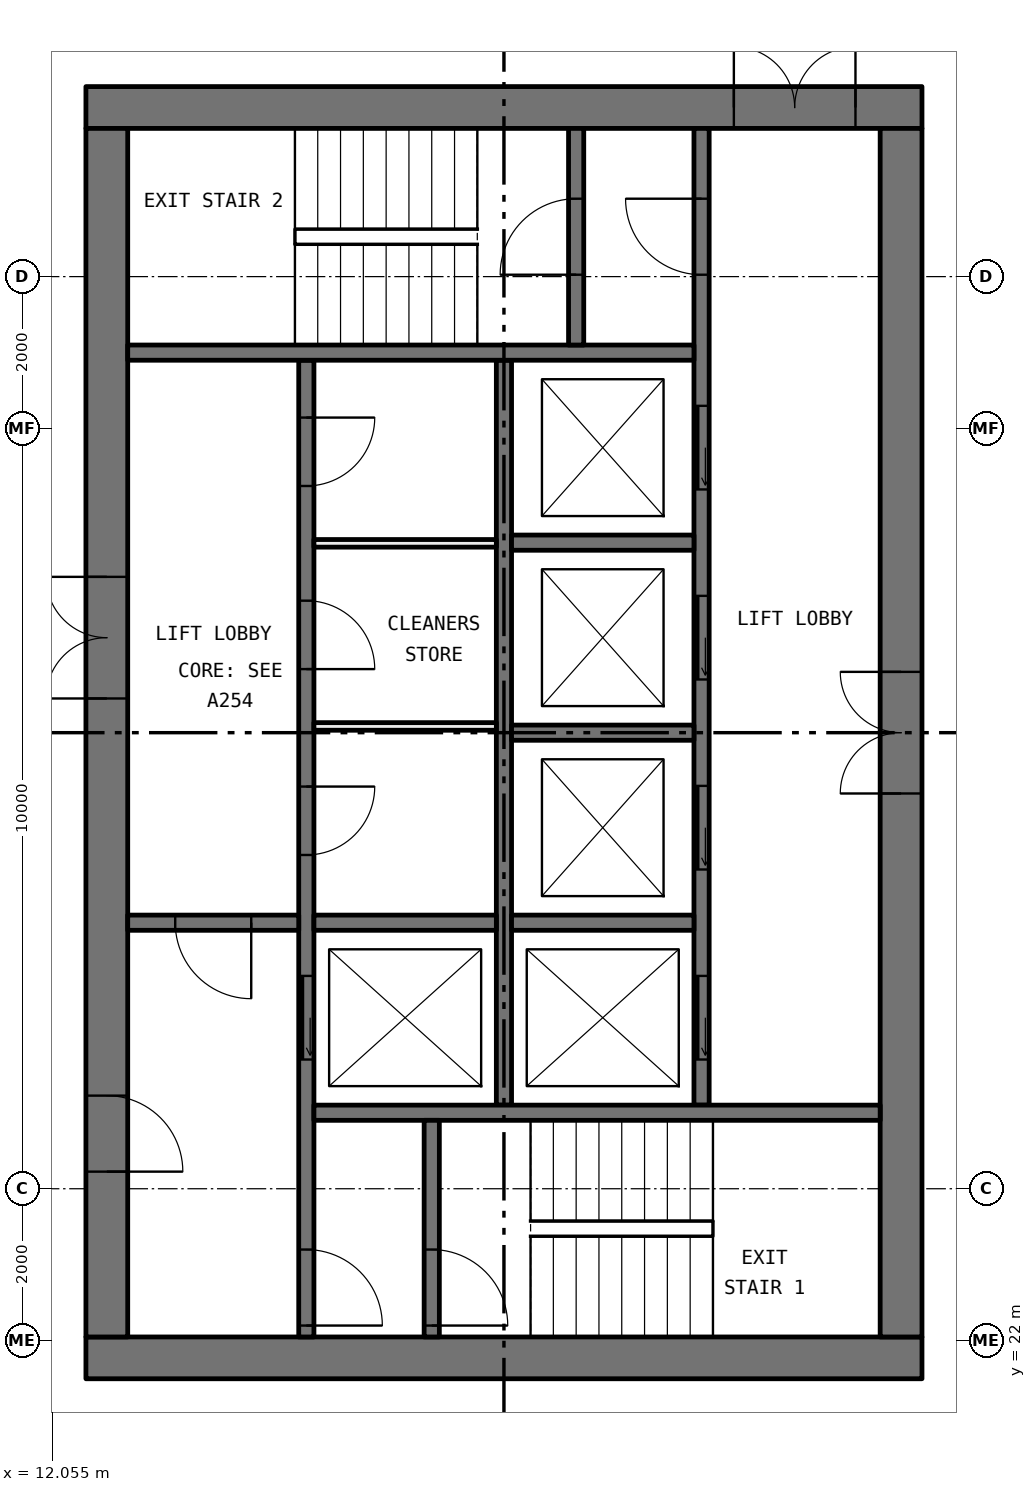
"""IFC4 building model, lengths in metres.
Left out: names, types, materials, properties, quantities, classifications, styles, units other than length and angle.
Written with IfcOpenShell. Run it as: python <this file> out.ifc"""

import sys

from ifc_helpers import new_model, si_unit, direction, frame, frame_2d, origin, place, context, subcontext, project, spatial, rectangle, extrude, element, fill, save


model = new_model("IFC4")
c1 = context("Model", 3, precision=1e-05, world=origin(), true_north=direction((0.0, 1.0)))
c2 = subcontext(c1, "Body", "Model", "MODEL_VIEW")
j1 = project(units=[si_unit("LENGTHUNIT", "METRE"), si_unit("PLANEANGLEUNIT", "RADIAN")], contexts=[c1])
p1 = place(None, origin())
s1 = spatial("IfcSite", under=j1, at=p1, CompositionType="ELEMENT")
p2 = place(p1, origin())
s2 = spatial("IfcBuilding", under=s1, at=p2, CompositionType="ELEMENT")
p3 = place(p2, frame((0.0, 0.0, 199.65)))
s3 = spatial("IfcBuildingStorey", under=s2, at=p3, CompositionType="ELEMENT", Elevation=199.65)
p4 = place(p3, frame((12.5, 21.775, 0.0), z_axis=(0.0, 0.0, 1.0), x_axis=(1.0, 0.0, 0.0)))
e1 = element("IfcWall", 1, at=p4, inside=s3, PredefinedType="SHEAR", context=c2, shape_type="SweptSolid", body=[
    extrude(rectangle(XDim=11.0, YDim=0.55, at=frame_2d((5.5, 0.0))), origin(), (0.0, 0.0, 1.0), 3.05),
])
p5 = place(p3, frame((12.5, 38.225, 0.0), z_axis=(0.0, 0.0, 1.0), x_axis=(1.0, 0.0, 0.0)))
e2 = element("IfcWall", 2, at=p5, inside=s3, PredefinedType="SHEAR", context=c2, shape_type="SweptSolid", body=[
    extrude(rectangle(XDim=11.0, YDim=0.55, at=frame_2d((5.5, 0.0))), origin(), (0.0, 0.0, 1.0), 3.05),
])
p6 = place(p5, frame((8.525, 0.0, 0.0)))
e3 = element("IfcOpeningElement", 3, at=p6, cuts=e2, PredefinedType="OPENING", context=c2, shape_type="SweptSolid", body=[
    extrude(rectangle(XDim=1.6, YDim=2.1, at=frame_2d((0.8, 1.05))), frame((0.0, 0.285, 0.0), z_axis=(0.0, -1.0, 0.0), x_axis=(1.0, 0.0, 0.0)), (0.0, 0.0, 1.0), 0.57),
])
p7 = place(p3, frame((12.775, 22.05, 0.0), z_axis=(0.0, 0.0, 1.0), x_axis=(0.0, 1.0, 0.0)))
e4 = element("IfcWall", 4, at=p7, inside=s3, PredefinedType="SHEAR", context=c2, shape_type="SweptSolid", body=[
    extrude(rectangle(XDim=15.9, YDim=0.55, at=frame_2d((7.95, 0.0))), origin(), (0.0, 0.0, 1.0), 3.05),
])
p8 = place(p7, frame((8.4, 0.0, 0.0)))
e5 = element("IfcOpeningElement", 5, at=p8, cuts=e4, PredefinedType="OPENING", context=c2, shape_type="SweptSolid", body=[
    extrude(rectangle(XDim=1.6, YDim=2.1, at=frame_2d((0.8, 1.05))), frame((0.0, 0.285, 0.0), z_axis=(0.0, -1.0, 0.0), x_axis=(1.0, 0.0, 0.0)), (0.0, 0.0, 1.0), 0.57),
])
p9 = place(p7, frame((2.175, 0.0, 0.0)))
e6 = element("IfcOpeningElement", 6, at=p9, cuts=e4, PredefinedType="OPENING", context=c2, shape_type="SweptSolid", body=[
    extrude(rectangle(XDim=1.0, YDim=2.1, at=frame_2d((0.5, 1.05))), frame((0.0, 0.285, 0.0), z_axis=(0.0, -1.0, 0.0), x_axis=(1.0, 0.0, 0.0)), (0.0, 0.0, 1.0), 0.57),
])
p10 = place(p3, frame((23.225, 22.05, 0.0), z_axis=(0.0, 0.0, 1.0), x_axis=(0.0, 1.0, 0.0)))
e7 = element("IfcWall", 7, at=p10, inside=s3, PredefinedType="SHEAR", context=c2, shape_type="SweptSolid", body=[
    extrude(rectangle(XDim=15.9, YDim=0.55, at=frame_2d((7.95, 0.0))), origin(), (0.0, 0.0, 1.0), 3.05),
])
p11 = place(p10, frame((7.15, 0.0, 0.0)))
e8 = element("IfcOpeningElement", 8, at=p11, cuts=e7, PredefinedType="OPENING", context=c2, shape_type="SweptSolid", body=[
    extrude(rectangle(XDim=1.6, YDim=2.1, at=frame_2d((0.8, 1.05))), frame((0.0, 0.285, 0.0), z_axis=(0.0, -1.0, 0.0), x_axis=(1.0, 0.0, 0.0)), (0.0, 0.0, 1.0), 0.57),
])
p12 = place(p3, frame((15.4, 22.05, 0.0), z_axis=(0.0, 0.0, 1.0), x_axis=(0.0, 1.0, 0.0)))
e9 = element("IfcWall", 9, at=p12, inside=s3, PredefinedType="SOLIDWALL", context=c2, shape_type="SweptSolid", body=[
    extrude(rectangle(XDim=12.85, YDim=0.2, at=frame_2d((6.425, 0.0))), origin(), (0.0, 0.0, 1.0), 3.05),
])
p13 = place(p12, frame((3.65, 0.0, 0.0)))
e10 = element("IfcOpeningElement", 10, at=p13, cuts=e9, PredefinedType="OPENING", context=c2, shape_type="SweptSolid", body=[
    extrude(rectangle(XDim=1.1, YDim=2.1, at=frame_2d((0.55, 1.05))), frame((0.0, 0.11, 0.0), z_axis=(0.0, -1.0, 0.0), x_axis=(1.0, 0.0, 0.0)), (0.0, 0.0, 1.0), 0.22),
])
p14 = place(p12, frame((0.15, 0.0, 0.0)))
e11 = element("IfcOpeningElement", 11, at=p14, cuts=e9, PredefinedType="OPENING", context=c2, shape_type="SweptSolid", body=[
    extrude(rectangle(XDim=1.0, YDim=2.1, at=frame_2d((0.5, 1.05))), frame((0.0, 0.11, 0.0), z_axis=(0.0, -1.0, 0.0), x_axis=(1.0, 0.0, 0.0)), (0.0, 0.0, 1.0), 0.22),
])
p15 = place(p12, frame((6.341, 0.0, 0.0)))
e12 = element("IfcOpeningElement", 12, at=p15, cuts=e9, PredefinedType="OPENING", context=c2, shape_type="SweptSolid", body=[
    extrude(rectangle(XDim=0.9, YDim=2.1, at=frame_2d((0.45, 1.05))), frame((0.0, 0.11, 0.0), z_axis=(0.0, -1.0, 0.0), x_axis=(1.0, 0.0, 0.0)), (0.0, 0.0, 1.0), 0.22),
])
p16 = place(p12, frame((8.787, 0.0, 0.0)))
e13 = element("IfcOpeningElement", 13, at=p16, cuts=e9, PredefinedType="OPENING", context=c2, shape_type="SweptSolid", body=[
    extrude(rectangle(XDim=0.9, YDim=2.1, at=frame_2d((0.45, 1.05))), frame((0.0, 0.11, 0.0), z_axis=(0.0, -1.0, 0.0), x_axis=(1.0, 0.0, 0.0)), (0.0, 0.0, 1.0), 0.22),
])
p17 = place(p12, frame((11.196, 0.0, 0.0)))
e14 = element("IfcOpeningElement", 14, at=p17, cuts=e9, PredefinedType="OPENING", context=c2, shape_type="SweptSolid", body=[
    extrude(rectangle(XDim=0.9, YDim=2.1, at=frame_2d((0.45, 1.05))), frame((0.0, 0.11, 0.0), z_axis=(0.0, -1.0, 0.0), x_axis=(1.0, 0.0, 0.0)), (0.0, 0.0, 1.0), 0.22),
])
p18 = place(p3, frame((20.6, 25.1, 0.0), z_axis=(0.0, 0.0, 1.0), x_axis=(0.0, 1.0, 0.0)))
e15 = element("IfcWall", 15, at=p18, inside=s3, PredefinedType="SOLIDWALL", context=c2, shape_type="SweptSolid", body=[
    extrude(rectangle(XDim=12.85, YDim=0.2, at=frame_2d((6.425, 0.0))), origin(), (0.0, 0.0, 1.0), 3.05),
])
p19 = place(p18, frame((0.6, 0.0, 0.0)))
e16 = element("IfcOpeningElement", 16, at=p19, cuts=e15, PredefinedType="OPENING", context=c2, shape_type="SweptSolid", body=[
    extrude(rectangle(XDim=1.1, YDim=2.1, at=frame_2d((0.55, 1.05))), frame((0.0, 0.11, 0.0), z_axis=(0.0, -1.0, 0.0), x_axis=(1.0, 0.0, 0.0)), (0.0, 0.0, 1.0), 0.22),
])
p20 = place(p18, frame((3.1, 0.0, 0.0)))
e17 = element("IfcOpeningElement", 17, at=p20, cuts=e15, PredefinedType="OPENING", context=c2, shape_type="SweptSolid", body=[
    extrude(rectangle(XDim=1.1, YDim=2.1, at=frame_2d((0.55, 1.05))), frame((0.0, 0.11, 0.0), z_axis=(0.0, -1.0, 0.0), x_axis=(1.0, 0.0, 0.0)), (0.0, 0.0, 1.0), 0.22),
])
p21 = place(p18, frame((5.6, 0.0, 0.0)))
e18 = element("IfcOpeningElement", 18, at=p21, cuts=e15, PredefinedType="OPENING", context=c2, shape_type="SweptSolid", body=[
    extrude(rectangle(XDim=1.1, YDim=2.1, at=frame_2d((0.55, 1.05))), frame((0.0, 0.11, 0.0), z_axis=(0.0, -1.0, 0.0), x_axis=(1.0, 0.0, 0.0)), (0.0, 0.0, 1.0), 0.22),
])
p22 = place(p18, frame((8.1, 0.0, 0.0)))
e19 = element("IfcOpeningElement", 19, at=p22, cuts=e15, PredefinedType="OPENING", context=c2, shape_type="SweptSolid", body=[
    extrude(rectangle(XDim=1.1, YDim=2.1, at=frame_2d((0.55, 1.05))), frame((0.0, 0.11, 0.0), z_axis=(0.0, -1.0, 0.0), x_axis=(1.0, 0.0, 0.0)), (0.0, 0.0, 1.0), 0.22),
])
p23 = place(p18, frame((10.925, 0.0, 0.0)))
e20 = element("IfcOpeningElement", 20, at=p23, cuts=e15, PredefinedType="OPENING", context=c2, shape_type="SweptSolid", body=[
    extrude(rectangle(XDim=1.0, YDim=2.1, at=frame_2d((0.5, 1.05))), frame((0.0, 0.11, 0.0), z_axis=(0.0, -1.0, 0.0), x_axis=(1.0, 0.0, 0.0)), (0.0, 0.0, 1.0), 0.22),
])
p24 = place(p3, frame((18.0, 25.1, 0.0), z_axis=(0.0, 0.0, 1.0), x_axis=(0.0, 1.0, 0.0)))
e21 = element("IfcWall", 21, at=p24, inside=s3, PredefinedType="SOLIDWALL", context=c2, shape_type="SweptSolid", body=[
    extrude(rectangle(XDim=9.8, YDim=0.2, at=frame_2d((4.9, 0.0))), origin(), (0.0, 0.0, 1.0), 3.05),
])
for number, where, z_axis, x_axis in (
    (22, (15.5, 25.0, 0.0), (0.0, 0.0, 1.0), (1.0, 0.0, 0.0)),
    (23, (13.05, 35.0, 0.0), (0.0, 0.0, 1.0), (1.0, 0.0, 0.0)),
):
    element("IfcWall", number, at=place(p3, frame(where, z_axis=z_axis, x_axis=x_axis)), inside=s3, PredefinedType="SOLIDWALL", context=c2, shape_type="SweptSolid", body=[
        extrude(rectangle(XDim=7.45, YDim=0.2, at=frame_2d((3.725, 0.0))), origin(), (0.0, 0.0, 1.0), 3.05),
    ])
p25 = place(p3, frame((13.05, 27.5, 0.0), z_axis=(0.0, 0.0, 1.0), x_axis=(1.0, 0.0, 0.0)))
e24 = element("IfcWall", 24, at=p25, inside=s3, PredefinedType="SOLIDWALL", context=c2, shape_type="SweptSolid", body=[
    extrude(rectangle(XDim=2.25, YDim=0.2, at=frame_2d((1.125, 0.0))), origin(), (0.0, 0.0, 1.0), 3.05),
])
p26 = place(p25, frame((0.625, 0.0, 0.0)))
e25 = element("IfcOpeningElement", 25, at=p26, cuts=e24, PredefinedType="OPENING", context=c2, shape_type="SweptSolid", body=[
    extrude(rectangle(XDim=1.0, YDim=2.1, at=frame_2d((0.5, 1.05))), frame((0.0, 0.11, 0.0), z_axis=(0.0, -1.0, 0.0), x_axis=(1.0, 0.0, 0.0)), (0.0, 0.0, 1.0), 0.22),
])
p27 = place(p3, frame((17.05, 22.05, 0.0), z_axis=(0.0, 0.0, 1.0), x_axis=(0.0, 1.0, 0.0)))
e26 = element("IfcWall", 26, at=p27, inside=s3, PredefinedType="SOLIDWALL", context=c2, shape_type="SweptSolid", body=[
    extrude(rectangle(XDim=2.85, YDim=0.2, at=frame_2d((1.425, 0.0))), origin(), (0.0, 0.0, 1.0), 3.05),
])
p28 = place(p27, frame((0.15, 0.0, 0.0)))
e27 = element("IfcOpeningElement", 27, at=p28, cuts=e26, PredefinedType="OPENING", context=c2, shape_type="SweptSolid", body=[
    extrude(rectangle(XDim=1.0, YDim=2.1, at=frame_2d((0.5, 1.05))), frame((0.0, 0.11, 0.0), z_axis=(0.0, -1.0, 0.0), x_axis=(1.0, 0.0, 0.0)), (0.0, 0.0, 1.0), 0.22),
])
p29 = place(p3, frame((18.95, 35.1, 0.0), z_axis=(0.0, 0.0, 1.0), x_axis=(0.0, 1.0, 0.0)))
e28 = element("IfcWall", 28, at=p29, inside=s3, PredefinedType="SOLIDWALL", context=c2, shape_type="SweptSolid", body=[
    extrude(rectangle(XDim=2.85, YDim=0.2, at=frame_2d((1.425, 0.0))), origin(), (0.0, 0.0, 1.0), 3.05),
])
p30 = place(p29, frame((0.925, 0.0, 0.0)))
e29 = element("IfcOpeningElement", 29, at=p30, cuts=e28, PredefinedType="OPENING", context=c2, shape_type="SweptSolid", body=[
    extrude(rectangle(XDim=1.0, YDim=2.1, at=frame_2d((0.5, 1.05))), frame((0.0, 0.11, 0.0), z_axis=(0.0, -1.0, 0.0), x_axis=(1.0, 0.0, 0.0)), (0.0, 0.0, 1.0), 0.22),
])
for number, where, z_axis, x_axis in (
    (30, (15.5, 27.5, 0.0), (0.0, 0.0, 1.0), (1.0, 0.0, 0.0)),
    (31, (18.1, 27.5, 0.0), (0.0, 0.0, 1.0), (1.0, 0.0, 0.0)),
    (32, (18.1, 30.0, 0.0), (0.0, 0.0, 1.0), (1.0, 0.0, 0.0)),
    (33, (18.1, 32.5, 0.0), (0.0, 0.0, 1.0), (1.0, 0.0, 0.0)),
):
    element("IfcWall", number, at=place(p3, frame(where, z_axis=z_axis, x_axis=x_axis)), inside=s3, PredefinedType="SOLIDWALL", context=c2, shape_type="SweptSolid", body=[
        extrude(rectangle(XDim=2.4, YDim=0.2, at=frame_2d((1.2, 0.0))), origin(), (0.0, 0.0, 1.0), 3.05),
    ])
for number, where, z_axis, x_axis in (
    (34, (15.5, 30.082, 0.0), (0.0, 0.0, 1.0), (1.0, 0.0, 0.0)),
    (35, (15.5, 32.491, 0.0), (0.0, 0.0, 1.0), (1.0, 0.0, 0.0)),
):
    element("IfcWall", number, at=place(p3, frame(where, z_axis=z_axis, x_axis=x_axis)), inside=s3, PredefinedType="PARTITIONING", context=c2, shape_type="SweptSolid", body=[
        extrude(rectangle(XDim=2.4, YDim=0.1, at=frame_2d((1.2, 0.0))), origin(), (0.0, 0.0, 1.0), 3.05),
    ])
p31 = place(p19, origin())
e36 = element("IfcDoor", 36, at=p31, inside=s3, OperationType="SLIDING_TO_LEFT", PredefinedType="DOOR", context=c2, shape_type="SweptSolid", body=[
    extrude(rectangle(XDim=1.1, YDim=2.1, at=frame_2d((0.55, 1.05))), frame((0.0, 0.025, 0.0), z_axis=(0.0, -1.0, 0.0), x_axis=(1.0, 0.0, 0.0)), (0.0, 0.0, 1.0), 0.05),
])
fill(e16, e36)
p32 = place(p20, origin())
e37 = element("IfcDoor", 37, at=p32, inside=s3, OperationType="SLIDING_TO_LEFT", PredefinedType="DOOR", context=c2, shape_type="SweptSolid", body=[
    extrude(rectangle(XDim=1.1, YDim=2.1, at=frame_2d((0.55, 1.05))), frame((0.0, 0.025, 0.0), z_axis=(0.0, -1.0, 0.0), x_axis=(1.0, 0.0, 0.0)), (0.0, 0.0, 1.0), 0.05),
])
fill(e17, e37)
p33 = place(p21, origin())
e38 = element("IfcDoor", 38, at=p33, inside=s3, OperationType="SLIDING_TO_LEFT", PredefinedType="DOOR", context=c2, shape_type="SweptSolid", body=[
    extrude(rectangle(XDim=1.1, YDim=2.1, at=frame_2d((0.55, 1.05))), frame((0.0, 0.025, 0.0), z_axis=(0.0, -1.0, 0.0), x_axis=(1.0, 0.0, 0.0)), (0.0, 0.0, 1.0), 0.05),
])
fill(e18, e38)
p34 = place(p22, origin())
e39 = element("IfcDoor", 39, at=p34, inside=s3, OperationType="SLIDING_TO_LEFT", PredefinedType="DOOR", context=c2, shape_type="SweptSolid", body=[
    extrude(rectangle(XDim=1.1, YDim=2.1, at=frame_2d((0.55, 1.05))), frame((0.0, 0.025, 0.0), z_axis=(0.0, -1.0, 0.0), x_axis=(1.0, 0.0, 0.0)), (0.0, 0.0, 1.0), 0.05),
])
fill(e19, e39)
p35 = place(p13, origin())
e40 = element("IfcDoor", 40, at=p35, inside=s3, OperationType="SLIDING_TO_LEFT", PredefinedType="DOOR", context=c2, shape_type="SweptSolid", body=[
    extrude(rectangle(XDim=1.1, YDim=2.1, at=frame_2d((0.55, 1.05))), frame((0.0, 0.025, 0.0), z_axis=(0.0, -1.0, 0.0), x_axis=(1.0, 0.0, 0.0)), (0.0, 0.0, 1.0), 0.05),
])
fill(e10, e40)
p36 = place(p28, frame((1.0, 0.0, 0.0), x_axis=(-1.0, 0.0, 0.0)))
e41 = element("IfcDoor", 41, at=p36, inside=s3, OperationType="SINGLE_SWING_LEFT", PredefinedType="DOOR", context=c2, shape_type="SweptSolid", body=[
    extrude(rectangle(XDim=1.0, YDim=2.1, at=frame_2d((0.5, 1.05))), frame((0.0, 0.025, 0.0), z_axis=(0.0, -1.0, 0.0), x_axis=(1.0, 0.0, 0.0)), (0.0, 0.0, 1.0), 0.05),
])
fill(e27, e41)
p37 = place(p14, frame((1.0, 0.0, 0.0), x_axis=(-1.0, 0.0, 0.0)))
e42 = element("IfcDoor", 42, at=p37, inside=s3, OperationType="SINGLE_SWING_LEFT", PredefinedType="DOOR", context=c2, shape_type="SweptSolid", body=[
    extrude(rectangle(XDim=1.0, YDim=2.1, at=frame_2d((0.5, 1.05))), frame((0.0, 0.025, 0.0), z_axis=(0.0, -1.0, 0.0), x_axis=(1.0, 0.0, 0.0)), (0.0, 0.0, 1.0), 0.05),
])
fill(e11, e42)
p38 = place(p23, origin())
e43 = element("IfcDoor", 43, at=p38, inside=s3, OperationType="SINGLE_SWING_LEFT", PredefinedType="DOOR", context=c2, shape_type="SweptSolid", body=[
    extrude(rectangle(XDim=1.0, YDim=2.1, at=frame_2d((0.5, 1.05))), frame((0.0, 0.025, 0.0), z_axis=(0.0, -1.0, 0.0), x_axis=(1.0, 0.0, 0.0)), (0.0, 0.0, 1.0), 0.05),
])
fill(e20, e43)
p39 = place(p30, origin())
e44 = element("IfcDoor", 44, at=p39, inside=s3, OperationType="SINGLE_SWING_RIGHT", PredefinedType="DOOR", context=c2, shape_type="SweptSolid", body=[
    extrude(rectangle(XDim=1.0, YDim=2.1, at=frame_2d((0.5, 1.05))), frame((0.0, 0.025, 0.0), z_axis=(0.0, -1.0, 0.0), x_axis=(1.0, 0.0, 0.0)), (0.0, 0.0, 1.0), 0.05),
])
fill(e29, e44)
p40 = place(p26, frame((1.0, 0.0, 0.0), x_axis=(-1.0, 0.0, 0.0)))
e45 = element("IfcDoor", 45, at=p40, inside=s3, OperationType="SINGLE_SWING_RIGHT", PredefinedType="DOOR", context=c2, shape_type="SweptSolid", body=[
    extrude(rectangle(XDim=1.0, YDim=2.1, at=frame_2d((0.5, 1.05))), frame((0.0, 0.025, 0.0), z_axis=(0.0, -1.0, 0.0), x_axis=(1.0, 0.0, 0.0)), (0.0, 0.0, 1.0), 0.05),
])
fill(e25, e45)
p41 = place(p8, origin())
e46 = element("IfcDoor", 46, at=p41, inside=s3, OperationType="DOUBLE_DOOR_SINGLE_SWING", PredefinedType="DOOR", context=c2, shape_type="SweptSolid", body=[
    extrude(rectangle(XDim=1.6, YDim=2.1, at=frame_2d((0.8, 1.05))), frame((0.0, 0.025, 0.0), z_axis=(0.0, -1.0, 0.0), x_axis=(1.0, 0.0, 0.0)), (0.0, 0.0, 1.0), 0.05),
])
fill(e5, e46)
p42 = place(p9, frame((1.0, 0.0, 0.0), x_axis=(-1.0, 0.0, 0.0)))
e47 = element("IfcDoor", 47, at=p42, inside=s3, OperationType="SINGLE_SWING_LEFT", PredefinedType="DOOR", context=c2, shape_type="SweptSolid", body=[
    extrude(rectangle(XDim=1.0, YDim=2.1, at=frame_2d((0.5, 1.05))), frame((0.0, 0.025, 0.0), z_axis=(0.0, -1.0, 0.0), x_axis=(1.0, 0.0, 0.0)), (0.0, 0.0, 1.0), 0.05),
])
fill(e6, e47)
p43 = place(p6, origin())
e48 = element("IfcDoor", 48, at=p43, inside=s3, OperationType="DOUBLE_DOOR_SINGLE_SWING", PredefinedType="DOOR", context=c2, shape_type="SweptSolid", body=[
    extrude(rectangle(XDim=1.6, YDim=2.1, at=frame_2d((0.8, 1.05))), frame((0.0, 0.025, 0.0), z_axis=(0.0, -1.0, 0.0), x_axis=(1.0, 0.0, 0.0)), (0.0, 0.0, 1.0), 0.05),
])
fill(e3, e48)
p44 = place(p11, origin())
e49 = element("IfcDoor", 49, at=p44, inside=s3, OperationType="DOUBLE_DOOR_SINGLE_SWING", PredefinedType="DOOR", context=c2, shape_type="SweptSolid", body=[
    extrude(rectangle(XDim=1.6, YDim=2.1, at=frame_2d((0.8, 1.05))), frame((0.0, 0.025, 0.0), z_axis=(0.0, -1.0, 0.0), x_axis=(1.0, 0.0, 0.0)), (0.0, 0.0, 1.0), 0.05),
])
fill(e8, e49)
p45 = place(p15, frame((0.9, 0.0, 0.0), x_axis=(-1.0, 0.0, 0.0)))
e50 = element("IfcDoor", 50, at=p45, inside=s3, OperationType="SINGLE_SWING_RIGHT", PredefinedType="DOOR", context=c2, shape_type="SweptSolid", body=[
    extrude(rectangle(XDim=0.9, YDim=2.1, at=frame_2d((0.45, 1.05))), frame((0.0, 0.025, 0.0), z_axis=(0.0, -1.0, 0.0), x_axis=(1.0, 0.0, 0.0)), (0.0, 0.0, 1.0), 0.05),
])
fill(e12, e50)
p46 = place(p16, frame((0.9, 0.0, 0.0), x_axis=(-1.0, 0.0, 0.0)))
e51 = element("IfcDoor", 51, at=p46, inside=s3, OperationType="SINGLE_SWING_LEFT", PredefinedType="DOOR", context=c2, shape_type="SweptSolid", body=[
    extrude(rectangle(XDim=0.9, YDim=2.1, at=frame_2d((0.45, 1.05))), frame((0.0, 0.025, 0.0), z_axis=(0.0, -1.0, 0.0), x_axis=(1.0, 0.0, 0.0)), (0.0, 0.0, 1.0), 0.05),
])
fill(e13, e51)
p47 = place(p17, frame((0.9, 0.0, 0.0), x_axis=(-1.0, 0.0, 0.0)))
e52 = element("IfcDoor", 52, at=p47, inside=s3, OperationType="SINGLE_SWING_RIGHT", PredefinedType="DOOR", context=c2, shape_type="SweptSolid", body=[
    extrude(rectangle(XDim=0.9, YDim=2.1, at=frame_2d((0.45, 1.05))), frame((0.0, 0.025, 0.0), z_axis=(0.0, -1.0, 0.0), x_axis=(1.0, 0.0, 0.0)), (0.0, 0.0, 1.0), 0.05),
])
fill(e14, e52)
save(model, sys.argv[1])
